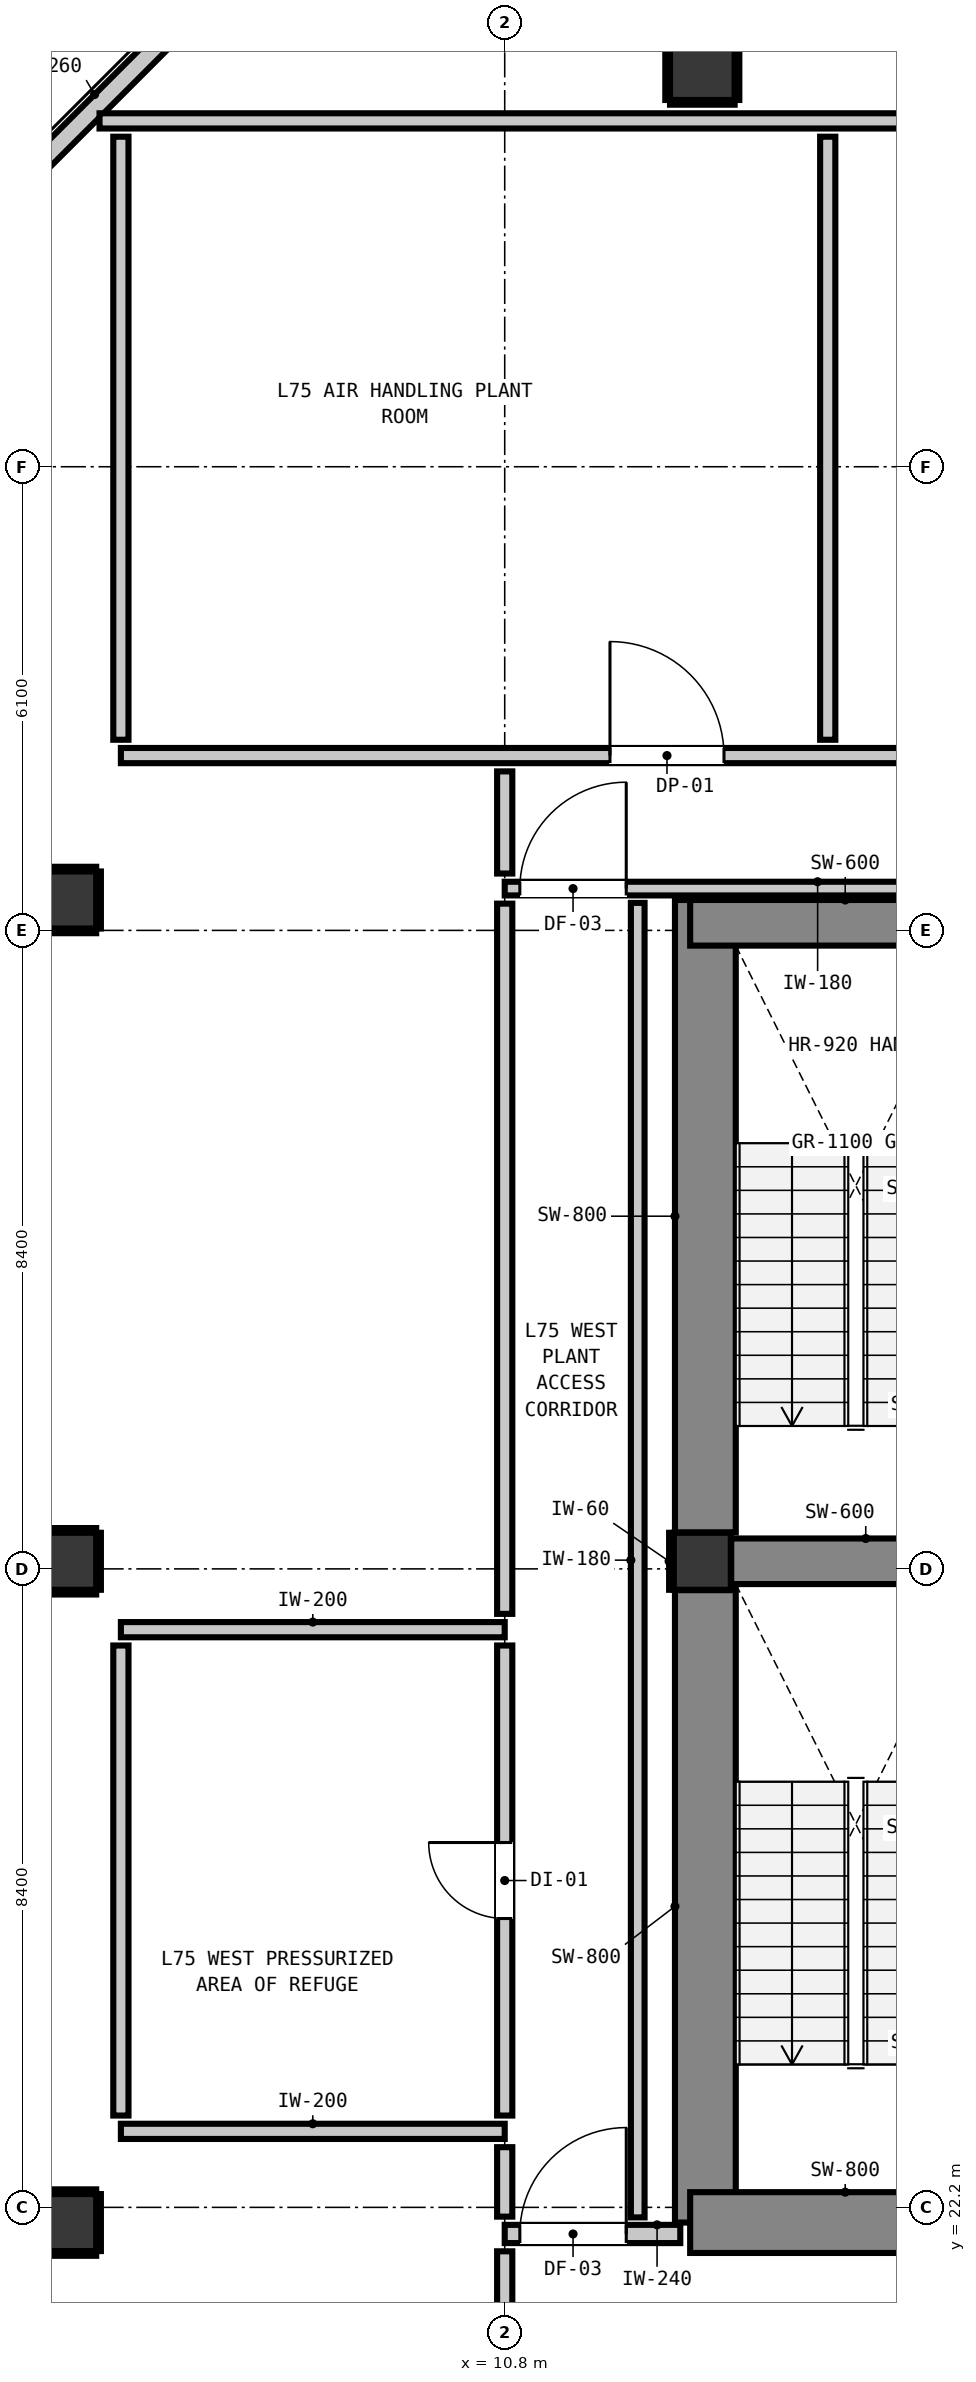
"""IFC4 building model, lengths in metres.
Left out: names, types, materials, properties, quantities, classifications, styles, units other than length and angle.
Written with IfcOpenShell. Run it as: python <this file> out.ifc"""

import sys

from ifc_helpers import new_model, si_unit, direction, frame, frame_2d, origin, origin_2d, place, context, subcontext, project, spatial, rectangle, extrude, element, fill, save


model = new_model("IFC4")
c1 = context("Model", 3, precision=1e-05, world=origin(), true_north=direction((0.0, 1.0)))
c2 = subcontext(c1, "Body", "Model", "MODEL_VIEW")
j1 = project(units=[si_unit("LENGTHUNIT", "METRE"), si_unit("PLANEANGLEUNIT", "RADIAN")], contexts=[c1])
p1 = place(None, origin())
s1 = spatial("IfcSite", under=j1, at=p1, CompositionType="ELEMENT")
p2 = place(p1, origin())
s2 = spatial("IfcBuilding", under=s1, at=p2, CompositionType="ELEMENT")
p3 = place(p2, frame((0.0, 0.0, 257.84)))
s3 = spatial("IfcBuildingStorey", under=s2, at=p3, CompositionType="ELEMENT", Elevation=257.84)
p4 = place(p3, frame((13.4, 30.7, 0.0), z_axis=(0.0, 0.0, 1.0), x_axis=(1.0, 0.0, 0.0)))
e1 = element("IfcColumn", 1, at=p4, inside=s3, PredefinedType="COLUMN", context=c2, shape_type="SweptSolid", body=[
    extrude(rectangle(XDim=0.75, YDim=0.75, at=origin_2d()), origin(), (0.0, 0.0, 1.0), 4.4),
])
p5 = place(p3, frame((13.44, 22.0, 0.0), z_axis=(0.0, 0.0, 1.0), x_axis=(0.0, 1.0, 0.0)))
e2 = element("IfcWall", 2, at=p5, inside=s3, PredefinedType="SHEAR", context=c2, shape_type="SweptSolid", body=[
    extrude(rectangle(XDim=8.32, YDim=0.8, at=frame_2d((4.16, 0.0))), origin(), (0.0, 0.0, 1.0), 4.4),
])
p6 = place(p3, frame((13.44, 31.08, 0.0), z_axis=(0.0, 0.0, 1.0), x_axis=(0.0, 1.0, 0.0)))
e3 = element("IfcWall", 3, at=p6, inside=s3, PredefinedType="SHEAR", context=c2, shape_type="SweptSolid", body=[
    extrude(rectangle(XDim=8.32, YDim=0.8, at=frame_2d((4.16, 0.0))), origin(), (0.0, 0.0, 1.0), 4.4),
])
p7 = place(p3, frame((13.24, 22.0, 0.0), z_axis=(0.0, 0.0, 1.0), x_axis=(1.0, 0.0, 0.0)))
e4 = element("IfcWall", 4, at=p7, inside=s3, PredefinedType="SHEAR", context=c2, shape_type="SweptSolid", body=[
    extrude(rectangle(XDim=4.08, YDim=0.8, at=frame_2d((2.04, 0.0))), origin(), (0.0, 0.0, 1.0), 4.4),
])
p8 = place(p3, frame((13.24, 39.1, 0.0), z_axis=(0.0, 0.0, 1.0), x_axis=(1.0, 0.0, 0.0)))
e5 = element("IfcWall", 5, at=p8, inside=s3, PredefinedType="SHEAR", context=c2, shape_type="SweptSolid", body=[
    extrude(rectangle(XDim=4.08, YDim=0.6, at=frame_2d((2.04, 0.0))), origin(), (0.0, 0.0, 1.0), 4.4),
])
p9 = place(p3, frame((13.78, 30.7, 0.0), z_axis=(0.0, 0.0, 1.0), x_axis=(1.0, 0.0, 0.0)))
e6 = element("IfcWall", 6, at=p9, inside=s3, PredefinedType="SHEAR", context=c2, shape_type="SweptSolid", body=[
    extrude(rectangle(XDim=3.54, YDim=0.6, at=frame_2d((1.77, 0.0))), origin(), (0.0, 0.0, 1.0), 4.4),
])
p10 = place(p3, frame((13.4, 50.35, 0.0), z_axis=(0.0, 0.0, 1.0), x_axis=(1.0, 0.0, 0.0)))
e7 = element("IfcColumn", 7, at=p10, inside=s3, PredefinedType="COLUMN", context=c2, shape_type="SweptSolid", body=[
    extrude(rectangle(XDim=0.85, YDim=0.85, at=origin_2d()), origin(), (0.0, 0.0, 1.0), 4.4),
])
for number, where, z_axis, x_axis in (
    (8, (5.05, 22.0, 0.0), (0.0, 0.0, 1.0), (1.0, 0.0, 0.0)),
    (9, (5.05, 30.7, 0.0), (0.0, 0.0, 1.0), (1.0, 0.0, 0.0)),
    (10, (5.05, 39.4, 0.0), (0.0, 0.0, 1.0), (1.0, 0.0, 0.0)),
):
    element("IfcColumn", number, at=place(p3, frame(where, z_axis=z_axis, x_axis=x_axis)), inside=s3, PredefinedType="COLUMN", context=c2, shape_type="SweptSolid", body=[
        extrude(rectangle(XDim=0.75, YDim=0.75, at=origin_2d()), origin(), (0.0, 0.0, 1.0), 4.4),
    ])
p11 = place(p3, frame((4.445, 48.855, 0.0), z_axis=(0.0, 0.0, 1.0), x_axis=(0.707065676302, 0.707147883682, 0.0)))
e11 = element("IfcWall", 11, at=p11, inside=s3, PredefinedType="STANDARD", context=c2, shape_type="SweptSolid", body=[
    extrude(rectangle(XDim=2.97, YDim=0.26, at=frame_2d((1.485, 0.0))), origin(), (0.0, 0.0, 1.0), 4.18),
])
p12 = place(p3, frame((10.8, 21.85, 0.0), z_axis=(0.0, 0.0, 1.0), x_axis=(1.0, 0.0, 0.0)))
e12 = element("IfcWall", 12, at=p12, inside=s3, PredefinedType="PARTITIONING", context=c2, shape_type="SweptSolid", body=[
    extrude(rectangle(XDim=2.31, YDim=0.24, at=frame_2d((1.155, 0.0))), origin(), (0.0, 0.0, 1.0), 3.807),
])
p13 = place(p12, frame((0.199, 0.0, 0.0)))
e13 = element("IfcOpeningElement", 13, at=p13, cuts=e12, PredefinedType="OPENING", context=c2, shape_type="SweptSolid", body=[
    extrude(rectangle(XDim=1.4, YDim=2.15, at=frame_2d((0.7, 1.075))), frame((0.0, 0.13, 0.0), z_axis=(0.0, -1.0, 0.0), x_axis=(1.0, 0.0, 0.0)), (0.0, 0.0, 1.0), 0.26),
])
for number, where, z_axis, x_axis in (
    (14, (5.75, 23.2, 0.0), (0.0, 0.0, 1.0), (1.0, 0.0, 0.0)),
    (15, (5.75, 29.8, 0.0), (0.0, 0.0, 1.0), (1.0, 0.0, 0.0)),
):
    element("IfcWall", number, at=place(p3, frame(where, z_axis=z_axis, x_axis=x_axis)), inside=s3, PredefinedType="PARTITIONING", context=c2, shape_type="SweptSolid", body=[
        extrude(rectangle(XDim=5.05, YDim=0.2, at=frame_2d((2.525, 0.0))), origin(), (0.0, 0.0, 1.0), 4.18),
    ])
p14 = place(p3, frame((5.75, 41.3, 0.0), z_axis=(0.0, 0.0, 1.0), x_axis=(1.0, 0.0, 0.0)))
e16 = element("IfcWall", 16, at=p14, inside=s3, PredefinedType="PARTITIONING", context=c2, shape_type="SweptSolid", body=[
    extrude(rectangle(XDim=34.3, YDim=0.2, at=frame_2d((17.15, 0.0))), origin(), (0.0, 0.0, 1.0), 4.18),
])
p15 = place(p14, frame((22.75, 0.0, 0.0)))
e17 = element("IfcOpeningElement", 17, at=p15, cuts=e16, PredefinedType="OPENING", context=c2, shape_type="SweptSolid", body=[
    extrude(rectangle(XDim=1.5, YDim=2.15, at=frame_2d((0.75, 1.075))), frame((0.0, 0.11, 0.0), z_axis=(0.0, -1.0, 0.0), x_axis=(1.0, 0.0, 0.0)), (0.0, 0.0, 1.0), 0.22),
])
p16 = place(p14, frame((29.465, 0.0, 0.0)))
e18 = element("IfcOpeningElement", 18, at=p16, cuts=e16, PredefinedType="OPENING", context=c2, shape_type="SweptSolid", body=[
    extrude(rectangle(XDim=1.5, YDim=2.15, at=frame_2d((0.75, 1.075))), frame((0.0, 0.11, 0.0), z_axis=(0.0, -1.0, 0.0), x_axis=(1.0, 0.0, 0.0)), (0.0, 0.0, 1.0), 0.22),
])
p17 = place(p14, frame((6.435, 0.0, 0.0)))
e19 = element("IfcOpeningElement", 19, at=p17, cuts=e16, PredefinedType="OPENING", context=c2, shape_type="SweptSolid", body=[
    extrude(rectangle(XDim=1.5, YDim=2.15, at=frame_2d((0.75, 1.075))), frame((0.0, 0.11, 0.0), z_axis=(0.0, -1.0, 0.0), x_axis=(1.0, 0.0, 0.0)), (0.0, 0.0, 1.0), 0.22),
])
p18 = place(p14, frame((13.2, 0.0, 0.0)))
e20 = element("IfcOpeningElement", 20, at=p18, cuts=e16, PredefinedType="OPENING", context=c2, shape_type="SweptSolid", body=[
    extrude(rectangle(XDim=1.5, YDim=2.15, at=frame_2d((0.75, 1.075))), frame((0.0, 0.11, 0.0), z_axis=(0.0, -1.0, 0.0), x_axis=(1.0, 0.0, 0.0)), (0.0, 0.0, 1.0), 0.22),
])
p19 = place(p3, frame((5.469, 49.65, 0.0), z_axis=(0.0, 0.0, 1.0), x_axis=(1.0, 0.0, 0.0)))
e21 = element("IfcWall", 21, at=p19, inside=s3, PredefinedType="PARTITIONING", context=c2, shape_type="SweptSolid", body=[
    extrude(rectangle(XDim=18.881, YDim=0.2, at=frame_2d((9.44, 0.0))), origin(), (0.0, 0.0, 1.0), 4.18),
])
p20 = place(p3, frame((10.8, 39.55, 0.0), z_axis=(0.0, 0.0, 1.0), x_axis=(1.0, 0.0, 0.0)))
e22 = element("IfcWall", 22, at=p20, inside=s3, PredefinedType="PARTITIONING", context=c2, shape_type="SweptSolid", body=[
    extrude(rectangle(XDim=9.523, YDim=0.18, at=frame_2d((4.761, 0.0))), origin(), (0.0, 0.0, 1.0), 3.807),
])
p21 = place(p20, frame((6.635, 0.0, 0.0)))
e23 = element("IfcOpeningElement", 23, at=p21, cuts=e22, PredefinedType="OPENING", context=c2, shape_type="SweptSolid", body=[
    extrude(rectangle(XDim=1.4, YDim=2.15, at=frame_2d((0.7, 1.075))), frame((0.0, 0.1, 0.0), z_axis=(0.0, -1.0, 0.0), x_axis=(1.0, 0.0, 0.0)), (0.0, 0.0, 1.0), 0.2),
])
p22 = place(p20, frame((0.199, 0.0, 0.0)))
e24 = element("IfcOpeningElement", 24, at=p22, cuts=e22, PredefinedType="OPENING", context=c2, shape_type="SweptSolid", body=[
    extrude(rectangle(XDim=1.4, YDim=2.15, at=frame_2d((0.7, 1.075))), frame((0.0, 0.1, 0.0), z_axis=(0.0, -1.0, 0.0), x_axis=(1.0, 0.0, 0.0)), (0.0, 0.0, 1.0), 0.2),
])
p23 = place(p3, frame((5.75, 23.408, 0.0), z_axis=(0.0, 0.0, 1.0), x_axis=(0.0, 1.0, 0.0)))
e25 = element("IfcWall", 25, at=p23, inside=s3, PredefinedType="PARTITIONING", context=c2, shape_type="SweptSolid", body=[
    extrude(rectangle(XDim=6.184, YDim=0.2, at=frame_2d((3.092, 0.0))), origin(), (0.0, 0.0, 1.0), 4.18),
])
p24 = place(p3, frame((5.75, 41.508, 0.0), z_axis=(0.0, 0.0, 1.0), x_axis=(0.0, 1.0, 0.0)))
e26 = element("IfcWall", 26, at=p24, inside=s3, PredefinedType="PARTITIONING", context=c2, shape_type="SweptSolid", body=[
    extrude(rectangle(XDim=7.934, YDim=0.2, at=frame_2d((3.967, 0.0))), origin(), (0.0, 0.0, 1.0), 4.18),
])
p25 = place(p3, frame((10.8, 20.308, 0.0), z_axis=(0.0, 0.0, 1.0), x_axis=(0.0, 1.0, 0.0)))
e27 = element("IfcWall", 27, at=p25, inside=s3, PredefinedType="PARTITIONING", context=c2, shape_type="SweptSolid", body=[
    extrude(rectangle(XDim=1.314, YDim=0.2, at=frame_2d((0.657, 0.0))), origin(), (0.0, 0.0, 1.0), 4.18),
])
p26 = place(p3, frame((10.8, 22.078, 0.0), z_axis=(0.0, 0.0, 1.0), x_axis=(0.0, 1.0, 0.0)))
e28 = element("IfcWall", 28, at=p26, inside=s3, PredefinedType="PARTITIONING", context=c2, shape_type="SweptSolid", body=[
    extrude(rectangle(XDim=0.914, YDim=0.2, at=frame_2d((0.457, 0.0))), origin(), (0.0, 0.0, 1.0), 4.18),
])
p27 = place(p3, frame((10.8, 23.408, 0.0), z_axis=(0.0, 0.0, 1.0), x_axis=(0.0, 1.0, 0.0)))
e29 = element("IfcWall", 29, at=p27, inside=s3, PredefinedType="PARTITIONING", context=c2, shape_type="SweptSolid", body=[
    extrude(rectangle(XDim=6.184, YDim=0.2, at=frame_2d((3.092, 0.0))), origin(), (0.0, 0.0, 1.0), 4.18),
])
p28 = place(p27, frame((2.592, 0.0, 0.0)))
e30 = element("IfcOpeningElement", 30, at=p28, cuts=e29, PredefinedType="OPENING", context=c2, shape_type="SweptSolid", body=[
    extrude(rectangle(XDim=1.0, YDim=2.15, at=frame_2d((0.5, 1.075))), frame((0.0, 0.11, 0.0), z_axis=(0.0, -1.0, 0.0), x_axis=(1.0, 0.0, 0.0)), (0.0, 0.0, 1.0), 0.22),
])
p29 = place(p3, frame((10.8, 30.008, 0.0), z_axis=(0.0, 0.0, 1.0), x_axis=(0.0, 1.0, 0.0)))
e31 = element("IfcWall", 31, at=p29, inside=s3, PredefinedType="PARTITIONING", context=c2, shape_type="SweptSolid", body=[
    extrude(rectangle(XDim=9.344, YDim=0.2, at=frame_2d((4.672, 0.0))), origin(), (0.0, 0.0, 1.0), 4.18),
])
p30 = place(p3, frame((10.8, 39.748, 0.0), z_axis=(0.0, 0.0, 1.0), x_axis=(0.0, 1.0, 0.0)))
e32 = element("IfcWall", 32, at=p30, inside=s3, PredefinedType="PARTITIONING", context=c2, shape_type="SweptSolid", body=[
    extrude(rectangle(XDim=1.344, YDim=0.2, at=frame_2d((0.672, 0.0))), origin(), (0.0, 0.0, 1.0), 4.18),
])
p31 = place(p3, frame((15.05, 41.508, 0.0), z_axis=(0.0, 0.0, 1.0), x_axis=(0.0, 1.0, 0.0)))
e33 = element("IfcWall", 33, at=p31, inside=s3, PredefinedType="PARTITIONING", context=c2, shape_type="SweptSolid", body=[
    extrude(rectangle(XDim=7.934, YDim=0.2, at=frame_2d((3.967, 0.0))), origin(), (0.0, 0.0, 1.0), 4.18),
])
p32 = place(p3, frame((12.55, 22.068, 0.0), z_axis=(0.0, 0.0, 1.0), x_axis=(0.0, 1.0, 0.0)))
e34 = element("IfcWall", 34, at=p32, inside=s3, PredefinedType="PARTITIONING", context=c2, shape_type="SweptSolid", body=[
    extrude(rectangle(XDim=17.294, YDim=0.18, at=frame_2d((8.647, 0.0))), origin(), (0.0, 0.0, 1.0), 4.18),
])
p33 = place(p3, frame((12.993, 30.325, 0.0), z_axis=(0.0, 0.0, 1.0), x_axis=(0.0, 1.0, 0.0)))
e35 = element("IfcWall", 35, at=p33, inside=s3, PredefinedType="PARTITIONING", context=c2, shape_type="SweptSolid", body=[
    extrude(rectangle(XDim=0.75, YDim=0.06, at=frame_2d((0.375, 0.0))), origin(), (0.0, 0.0, 1.0), 1.45),
])
for number, where, z_axis, x_axis in (
    (36, (12.975, 49.893, 0.0), (0.0, 0.0, 1.0), (1.0, 0.0, 0.0)),
    (37, (12.943, 49.925, 0.0), (0.0, 0.0, 1.0), (0.0, 1.0, 0.0)),
    (38, (13.857, 49.925, 0.0), (0.0, 0.0, 1.0), (0.0, 1.0, 0.0)),
):
    element("IfcWall", number, at=place(p3, frame(where, z_axis=z_axis, x_axis=x_axis)), inside=s3, PredefinedType="PARTITIONING", context=c2, shape_type="SweptSolid", body=[
        extrude(rectangle(XDim=0.85, YDim=0.06, at=frame_2d((0.425, 0.0))), origin(), (0.0, 0.0, 1.0), 1.45),
    ])
for number, where, z_axis, x_axis in (
    (39, (4.675, 21.593, 0.0), (0.0, 0.0, 1.0), (1.0, 0.0, 0.0)),
    (40, (4.675, 22.407, 0.0), (0.0, 0.0, 1.0), (1.0, 0.0, 0.0)),
    (41, (5.457, 21.625, 0.0), (0.0, 0.0, 1.0), (0.0, 1.0, 0.0)),
    (42, (4.675, 30.293, 0.0), (0.0, 0.0, 1.0), (1.0, 0.0, 0.0)),
    (43, (4.675, 31.107, 0.0), (0.0, 0.0, 1.0), (1.0, 0.0, 0.0)),
    (44, (5.457, 30.325, 0.0), (0.0, 0.0, 1.0), (0.0, 1.0, 0.0)),
    (45, (4.675, 38.993, 0.0), (0.0, 0.0, 1.0), (1.0, 0.0, 0.0)),
    (46, (4.675, 39.807, 0.0), (0.0, 0.0, 1.0), (1.0, 0.0, 0.0)),
    (47, (5.457, 39.025, 0.0), (0.0, 0.0, 1.0), (0.0, 1.0, 0.0)),
):
    element("IfcWall", number, at=place(p3, frame(where, z_axis=z_axis, x_axis=x_axis)), inside=s3, PredefinedType="PARTITIONING", context=c2, shape_type="SweptSolid", body=[
        extrude(rectangle(XDim=0.75, YDim=0.06, at=frame_2d((0.375, 0.0))), origin(), (0.0, 0.0, 1.0), 1.45),
    ])
p34 = place(p13, origin())
e48 = element("IfcDoor", 48, at=p34, inside=s3, OperationType="SINGLE_SWING_RIGHT", PredefinedType="DOOR", context=c2, shape_type="SweptSolid", body=[
    extrude(rectangle(XDim=1.4, YDim=2.15, at=frame_2d((0.7, 1.075))), frame((0.0, 0.025, 0.0), z_axis=(0.0, -1.0, 0.0), x_axis=(1.0, 0.0, 0.0)), (0.0, 0.0, 1.0), 0.05),
])
fill(e13, e48)
p35 = place(p22, origin())
e49 = element("IfcDoor", 49, at=p35, inside=s3, OperationType="SINGLE_SWING_RIGHT", PredefinedType="DOOR", context=c2, shape_type="SweptSolid", body=[
    extrude(rectangle(XDim=1.4, YDim=2.15, at=frame_2d((0.7, 1.075))), frame((0.0, 0.025, 0.0), z_axis=(0.0, -1.0, 0.0), x_axis=(1.0, 0.0, 0.0)), (0.0, 0.0, 1.0), 0.05),
])
fill(e24, e49)
p36 = place(p28, origin())
e50 = element("IfcDoor", 50, at=p36, inside=s3, OperationType="SINGLE_SWING_RIGHT", PredefinedType="DOOR", context=c2, shape_type="SweptSolid", body=[
    extrude(rectangle(XDim=1.0, YDim=2.15, at=frame_2d((0.5, 1.075))), frame((0.0, 0.025, 0.0), z_axis=(0.0, -1.0, 0.0), x_axis=(1.0, 0.0, 0.0)), (0.0, 0.0, 1.0), 0.05),
])
fill(e30, e50)
p37 = place(p17, origin())
e51 = element("IfcDoor", 51, at=p37, inside=s3, OperationType="SINGLE_SWING_LEFT", PredefinedType="DOOR", context=c2, shape_type="SweptSolid", body=[
    extrude(rectangle(XDim=1.5, YDim=2.15, at=frame_2d((0.75, 1.075))), frame((0.0, 0.025, 0.0), z_axis=(0.0, -1.0, 0.0), x_axis=(1.0, 0.0, 0.0)), (0.0, 0.0, 1.0), 0.05),
])
fill(e19, e51)
save(model, sys.argv[1])
